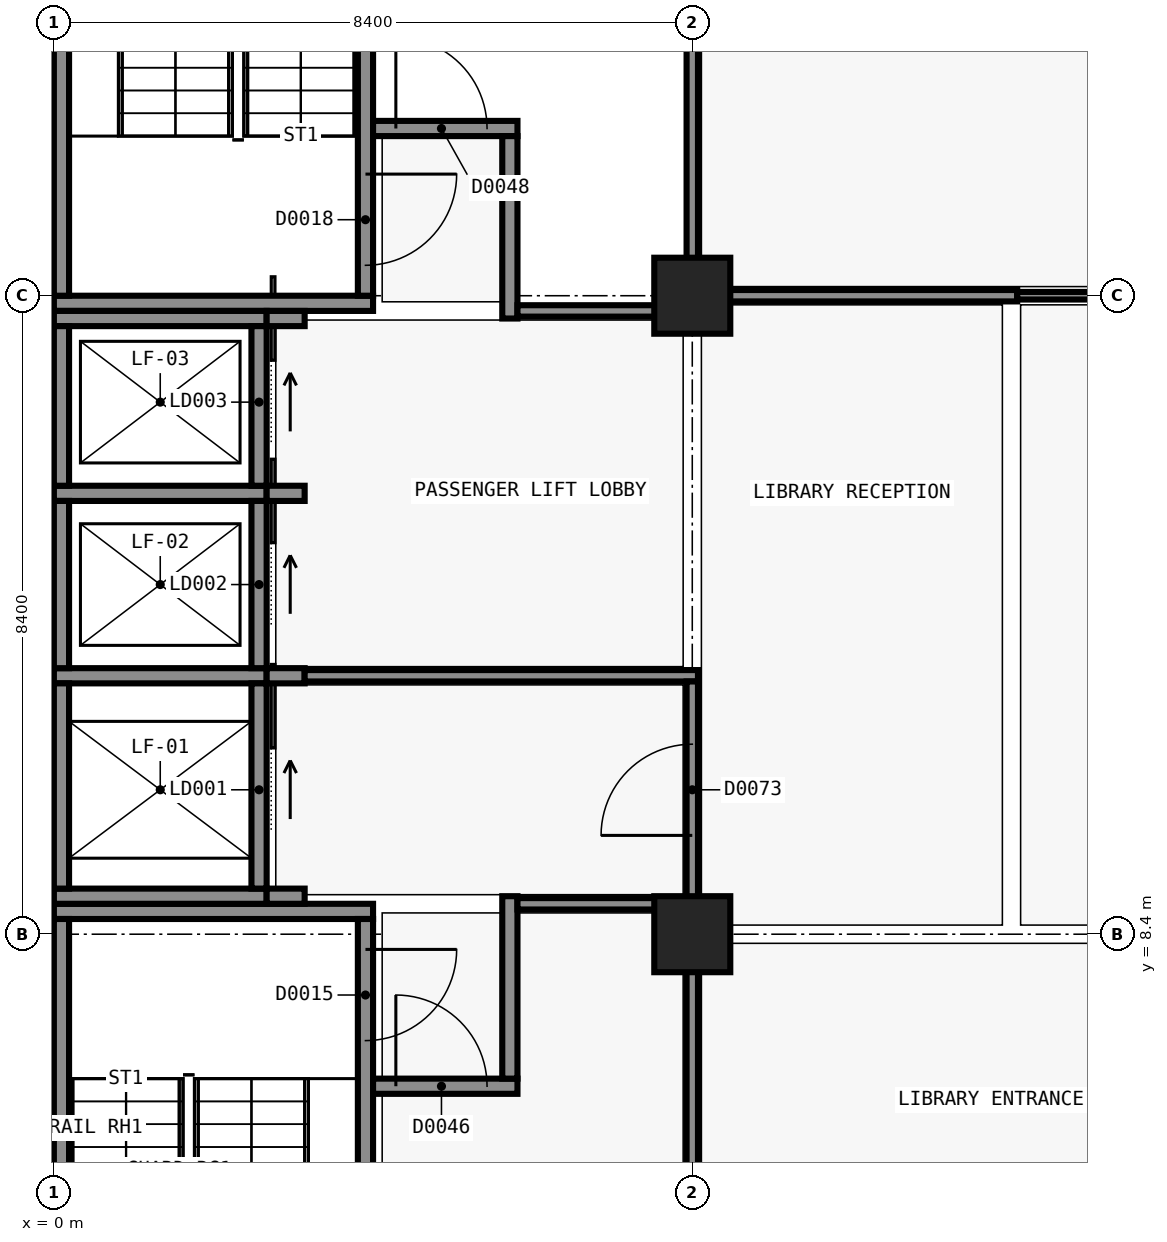
"""IFC4 building model, lengths in metres.
Left out: names, types, materials, properties, quantities, classifications, styles, units other than length and angle.
Written with IfcOpenShell. Run it as: python <this file> out.ifc"""

import sys

from ifc_helpers import new_model, si_unit, direction, frame, frame_2d, origin, origin_2d, place, context, subcontext, project, spatial, rectangle, extrude, element, fill, save


model = new_model("IFC4")
c1 = context("Model", 3, precision=1e-05, world=origin(), true_north=direction((0.0, 1.0)))
c2 = subcontext(c1, "Body", "Model", "MODEL_VIEW")
j1 = project(units=[si_unit("LENGTHUNIT", "METRE"), si_unit("PLANEANGLEUNIT", "RADIAN")], contexts=[c1])
p1 = place(None, origin())
s1 = spatial("IfcSite", under=j1, at=p1, CompositionType="ELEMENT")
p2 = place(p1, origin())
s2 = spatial("IfcBuilding", under=s1, at=p2, CompositionType="ELEMENT")
p3 = place(p2, origin())
s3 = spatial("IfcBuildingStorey", under=s2, at=p3, CompositionType="ELEMENT", Elevation=0.0)
p4 = place(p3, frame((0.0, 8.7, -0.3), z_axis=(0.0, 0.0, 1.0), x_axis=(1.0, 0.0, 0.0)))
e1 = element("IfcWall", 1, at=p4, inside=s3, PredefinedType="SHEAR", context=c2, shape_type="SweptSolid", body=[
    extrude(rectangle(XDim=4.199, YDim=0.2, at=frame_2d((2.1, 0.0))), origin(), (0.0, 0.0, 1.0), 5.7),
])
p5 = place(p3, frame((0.1, 0.2, -0.3), z_axis=(0.0, 0.0, 1.0), x_axis=(0.0, 1.0, 0.0)))
e2 = element("IfcWall", 2, at=p5, inside=s3, PredefinedType="SHEAR", context=c2, shape_type="SweptSolid", body=[
    extrude(rectangle(XDim=8.4, YDim=0.2, at=frame_2d((4.2, 0.0))), origin(), (0.0, 0.0, 1.0), 5.7),
])
p6 = place(p3, frame((4.1, 8.6, -0.3), z_axis=(0.0, 0.0, 1.0), x_axis=(0.0, -1.0, 0.0)))
e3 = element("IfcWall", 3, at=p6, inside=s3, PredefinedType="SHEAR", context=c2, shape_type="SweptSolid", body=[
    extrude(rectangle(XDim=8.4, YDim=0.2, at=frame_2d((4.2, 0.0))), origin(), (0.0, 0.0, 1.0), 5.7),
])
p7 = place(p6, frame((0.4, 0.0, 0.3)))
e4 = element("IfcOpeningElement", 4, at=p7, cuts=e3, PredefinedType="OPENING", context=c2, shape_type="SweptSolid", body=[
    extrude(rectangle(XDim=1.2, YDim=2.1, at=frame_2d((0.6, 1.05))), frame((0.0, 0.11, 0.0), z_axis=(0.0, -1.0, 0.0), x_axis=(1.0, 0.0, 0.0)), (0.0, 0.0, 1.0), 0.22),
])
p8 = place(p3, frame((4.2, 16.7, -0.3), z_axis=(0.0, 0.0, 1.0), x_axis=(-1.0, 0.0, 0.0)))
e5 = element("IfcWall", 5, at=p8, inside=s3, PredefinedType="SHEAR", context=c2, shape_type="SweptSolid", body=[
    extrude(rectangle(XDim=4.199, YDim=0.2, at=frame_2d((2.1, 0.0))), origin(), (0.0, 0.0, 1.0), 5.7),
])
p9 = place(p3, frame((0.1, 16.8, -0.3), z_axis=(0.0, 0.0, 1.0), x_axis=(0.0, 1.0, 0.0)))
e6 = element("IfcWall", 6, at=p9, inside=s3, PredefinedType="SHEAR", context=c2, shape_type="SweptSolid", body=[
    extrude(rectangle(XDim=8.2, YDim=0.2, at=frame_2d((4.1, 0.0))), origin(), (0.0, 0.0, 1.0), 5.7),
])
p10 = place(p3, frame((4.1, 25.0, -0.3), z_axis=(0.0, 0.0, 1.0), x_axis=(0.0, -1.0, 0.0)))
e7 = element("IfcWall", 7, at=p10, inside=s3, PredefinedType="SHEAR", context=c2, shape_type="SweptSolid", body=[
    extrude(rectangle(XDim=8.2, YDim=0.2, at=frame_2d((4.1, 0.0))), origin(), (0.0, 0.0, 1.0), 5.7),
])
p11 = place(p10, frame((6.6, 0.0, 0.3)))
e8 = element("IfcOpeningElement", 8, at=p11, cuts=e7, PredefinedType="OPENING", context=c2, shape_type="SweptSolid", body=[
    extrude(rectangle(XDim=1.2, YDim=2.1, at=frame_2d((0.6, 1.05))), frame((0.0, 0.11, 0.0), z_axis=(0.0, -1.0, 0.0), x_axis=(1.0, 0.0, 0.0)), (0.0, 0.0, 1.0), 0.22),
])
for number, where, z_axis, x_axis in (
    (9, (2.8, 8.9, -1.6), (0.0, 0.0, 1.0), (-1.0, 0.0, 0.0)),
    (10, (0.0, 11.8, -1.6), (0.0, 0.0, 1.0), (1.0, 0.0, 0.0)),
):
    element("IfcWall", number, at=place(p3, frame(where, z_axis=z_axis, x_axis=x_axis)), inside=s3, PredefinedType="SHEAR", context=c2, shape_type="SweptSolid", body=[
        extrude(rectangle(XDim=2.8, YDim=0.2, at=frame_2d((1.4, 0.0))), origin(), (0.0, 0.0, 1.0), 7.0),
    ])
p12 = place(p3, frame((0.1, 9.0, -1.6), z_axis=(0.0, 0.0, 1.0), x_axis=(0.0, 1.0, 0.0)))
e11 = element("IfcWall", 11, at=p12, inside=s3, PredefinedType="SHEAR", context=c2, shape_type="SweptSolid", body=[
    extrude(rectangle(XDim=2.7, YDim=0.2, at=frame_2d((1.35, 0.0))), origin(), (0.0, 0.0, 1.0), 7.0),
])
p13 = place(p3, frame((2.7, 11.7, -1.6), z_axis=(0.0, 0.0, 1.0), x_axis=(0.0, -1.0, 0.0)))
e12 = element("IfcWall", 12, at=p13, inside=s3, PredefinedType="SHEAR", context=c2, shape_type="SweptSolid", body=[
    extrude(rectangle(XDim=2.7, YDim=0.2, at=frame_2d((1.35, 0.0))), origin(), (0.0, 0.0, 1.0), 7.0),
])
p14 = place(p13, frame((0.85, 0.0, 1.6)))
e13 = element("IfcOpeningElement", 13, at=p14, cuts=e12, PredefinedType="OPENING", context=c2, shape_type="SweptSolid", body=[
    extrude(rectangle(XDim=1.1, YDim=2.1, at=frame_2d((0.55, 1.05))), frame((0.0, 0.11, 0.0), z_axis=(0.0, -1.0, 0.0), x_axis=(1.0, 0.0, 0.0)), (0.0, 0.0, 1.0), 0.22),
])
p15 = place(p3, frame((0.0, 14.2, -1.6), z_axis=(0.0, 0.0, 1.0), x_axis=(1.0, 0.0, 0.0)))
e14 = element("IfcWall", 14, at=p15, inside=s3, PredefinedType="SHEAR", context=c2, shape_type="SweptSolid", body=[
    extrude(rectangle(XDim=2.8, YDim=0.2, at=frame_2d((1.4, 0.0))), origin(), (0.0, 0.0, 1.0), 7.0),
])
p16 = place(p3, frame((0.1, 11.9, -1.6), z_axis=(0.0, 0.0, 1.0), x_axis=(0.0, 1.0, 0.0)))
e15 = element("IfcWall", 15, at=p16, inside=s3, PredefinedType="SHEAR", context=c2, shape_type="SweptSolid", body=[
    extrude(rectangle(XDim=2.2, YDim=0.2, at=frame_2d((1.1, 0.0))), origin(), (0.0, 0.0, 1.0), 7.0),
])
p17 = place(p3, frame((2.7, 14.1, -1.6), z_axis=(0.0, 0.0, 1.0), x_axis=(0.0, -1.0, 0.0)))
e16 = element("IfcWall", 16, at=p17, inside=s3, PredefinedType="SHEAR", context=c2, shape_type="SweptSolid", body=[
    extrude(rectangle(XDim=2.2, YDim=0.2, at=frame_2d((1.1, 0.0))), origin(), (0.0, 0.0, 1.0), 7.0),
])
p18 = place(p17, frame((0.55, 0.0, 1.6)))
e17 = element("IfcOpeningElement", 17, at=p18, cuts=e16, PredefinedType="OPENING", context=c2, shape_type="SweptSolid", body=[
    extrude(rectangle(XDim=1.1, YDim=2.1, at=frame_2d((0.55, 1.05))), frame((0.0, 0.11, 0.0), z_axis=(0.0, -1.0, 0.0), x_axis=(1.0, 0.0, 0.0)), (0.0, 0.0, 1.0), 0.22),
])
p19 = place(p3, frame((0.0, 16.5, -1.6), z_axis=(0.0, 0.0, 1.0), x_axis=(1.0, 0.0, 0.0)))
e18 = element("IfcWall", 18, at=p19, inside=s3, PredefinedType="SHEAR", context=c2, shape_type="SweptSolid", body=[
    extrude(rectangle(XDim=2.8, YDim=0.2, at=frame_2d((1.4, 0.0))), origin(), (0.0, 0.0, 1.0), 7.0),
])
p20 = place(p3, frame((0.1, 14.3, -1.6), z_axis=(0.0, 0.0, 1.0), x_axis=(0.0, 1.0, 0.0)))
e19 = element("IfcWall", 19, at=p20, inside=s3, PredefinedType="SHEAR", context=c2, shape_type="SweptSolid", body=[
    extrude(rectangle(XDim=2.1, YDim=0.2, at=frame_2d((1.05, 0.0))), origin(), (0.0, 0.0, 1.0), 7.0),
])
p21 = place(p3, frame((2.7, 16.4, -1.6), z_axis=(0.0, 0.0, 1.0), x_axis=(0.0, -1.0, 0.0)))
e20 = element("IfcWall", 20, at=p21, inside=s3, PredefinedType="SHEAR", context=c2, shape_type="SweptSolid", body=[
    extrude(rectangle(XDim=2.1, YDim=0.2, at=frame_2d((1.05, 0.0))), origin(), (0.0, 0.0, 1.0), 7.0),
])
p22 = place(p21, frame((0.45, 0.0, 1.6)))
e21 = element("IfcOpeningElement", 21, at=p22, cuts=e20, PredefinedType="OPENING", context=c2, shape_type="SweptSolid", body=[
    extrude(rectangle(XDim=1.1, YDim=2.1, at=frame_2d((0.55, 1.05))), frame((0.0, 0.11, 0.0), z_axis=(0.0, -1.0, 0.0), x_axis=(1.0, 0.0, 0.0)), (0.0, 0.0, 1.0), 0.22),
])
for number, where, z_axis, x_axis in (
    (22, (8.4, 8.4, -0.3), (0.0, 0.0, 1.0), (1.0, 0.0, 0.0)),
    (23, (8.4, 16.8, -0.3), (0.0, 0.0, 1.0), (1.0, 0.0, 0.0)),
):
    element("IfcColumn", number, at=place(p3, frame(where, z_axis=z_axis, x_axis=x_axis)), inside=s3, PredefinedType="COLUMN", context=c2, shape_type="SweptSolid", body=[
        extrude(rectangle(XDim=1.0, YDim=1.0, at=origin_2d()), origin(), (0.0, 0.0, 1.0), 5.7),
    ])
for number, where, z_axis, x_axis in (
    (24, (3.3, 8.9, -0.3), (0.0, 0.0, 1.0), (-1.0, 0.0, 0.0)),
    (25, (2.8, 11.8, -0.3), (0.0, 0.0, 1.0), (1.0, 0.0, 0.0)),
    (26, (2.8, 14.2, -0.3), (0.0, 0.0, 1.0), (1.0, 0.0, 0.0)),
    (27, (2.8, 16.5, -0.3), (0.0, 0.0, 1.0), (1.0, 0.0, 0.0)),
):
    element("IfcWall", number, at=place(p3, frame(where, z_axis=z_axis, x_axis=x_axis)), inside=s3, PredefinedType="SHEAR", context=c2, shape_type="SweptSolid", body=[
        extrude(rectangle(XDim=0.5, YDim=0.2, at=frame_2d((0.25, 0.0))), origin(), (0.0, 0.0, 1.0), 5.7),
    ])
p23 = place(p3, frame((4.2, 6.4, 0.0), z_axis=(0.0, 0.0, 1.0), x_axis=(1.0, 0.0, 0.0)))
e28 = element("IfcWall", 28, at=p23, inside=s3, PredefinedType="SOLIDWALL", context=c2, shape_type="SweptSolid", body=[
    extrude(rectangle(XDim=1.9, YDim=0.2, at=frame_2d((0.95, 0.0))), origin(), (0.0, 0.0, 1.0), 5.1),
])
p24 = place(p23, frame((0.3, 0.0, 0.0)))
e29 = element("IfcOpeningElement", 29, at=p24, cuts=e28, PredefinedType="OPENING", context=c2, shape_type="SweptSolid", body=[
    extrude(rectangle(XDim=1.2, YDim=2.1, at=frame_2d((0.6, 1.05))), frame((0.0, 0.11, 0.0), z_axis=(0.0, -1.0, 0.0), x_axis=(1.0, 0.0, 0.0)), (0.0, 0.0, 1.0), 0.22),
])
p25 = place(p3, frame((4.2, 19.0, 0.0), z_axis=(0.0, 0.0, 1.0), x_axis=(1.0, 0.0, 0.0)))
e30 = element("IfcWall", 30, at=p25, inside=s3, PredefinedType="SOLIDWALL", context=c2, shape_type="SweptSolid", body=[
    extrude(rectangle(XDim=1.9, YDim=0.2, at=frame_2d((0.95, 0.0))), origin(), (0.0, 0.0, 1.0), 5.1),
])
p26 = place(p25, frame((0.3, 0.0, 0.0)))
e31 = element("IfcOpeningElement", 31, at=p26, cuts=e30, PredefinedType="OPENING", context=c2, shape_type="SweptSolid", body=[
    extrude(rectangle(XDim=1.2, YDim=2.1, at=frame_2d((0.6, 1.05))), frame((0.0, 0.11, 0.0), z_axis=(0.0, -1.0, 0.0), x_axis=(1.0, 0.0, 0.0)), (0.0, 0.0, 1.0), 0.22),
])
for number, where, z_axis, x_axis in (
    (32, (6.0, 6.5, 0.0), (0.0, 0.0, 1.0), (0.0, 1.0, 0.0)),
    (33, (6.0, 16.5, 0.0), (0.0, 0.0, 1.0), (0.0, 1.0, 0.0)),
):
    element("IfcWall", number, at=place(p3, frame(where, z_axis=z_axis, x_axis=x_axis)), inside=s3, PredefinedType="SOLIDWALL", context=c2, shape_type="SweptSolid", body=[
        extrude(rectangle(XDim=2.4, YDim=0.2, at=frame_2d((1.2, 0.0))), origin(), (0.0, 0.0, 1.0), 4.6),
    ])
p27 = place(p3, frame((8.325, 16.8, 0.0), z_axis=(0.0, 0.0, 1.0), x_axis=(1.0, 0.0, 0.0)))
e34 = element("IfcWall", 34, at=p27, inside=s3, PredefinedType="PARTITIONING", context=c2, shape_type="SweptSolid", body=[
    extrude(rectangle(XDim=4.35, YDim=0.15, at=frame_2d((2.175, 0.0))), origin(), (0.0, 0.0, 1.0), 4.4),
])
p28 = place(p3, frame((6.1, 8.8, 0.0), z_axis=(0.0, 0.0, 1.0), x_axis=(1.0, 0.0, 0.0)))
e35 = element("IfcWall", 35, at=p28, inside=s3, PredefinedType="SOLIDWALL", context=c2, shape_type="SweptSolid", body=[
    extrude(rectangle(XDim=2.375, YDim=0.15, at=frame_2d((1.188, 0.0))), origin(), (0.0, 0.0, 1.0), 4.4),
])
p29 = place(p3, frame((3.3, 11.8, 0.0), z_axis=(0.0, 0.0, 1.0), x_axis=(1.0, 0.0, 0.0)))
e36 = element("IfcWall", 36, at=p29, inside=s3, PredefinedType="SOLIDWALL", context=c2, shape_type="SweptSolid", body=[
    extrude(rectangle(XDim=5.175, YDim=0.15, at=frame_2d((2.587, 0.0))), origin(), (0.0, 0.0, 1.0), 4.4),
])
p30 = place(p3, frame((6.1, 16.6, 0.0), z_axis=(0.0, 0.0, 1.0), x_axis=(1.0, 0.0, 0.0)))
e37 = element("IfcWall", 37, at=p30, inside=s3, PredefinedType="SOLIDWALL", context=c2, shape_type="SweptSolid", body=[
    extrude(rectangle(XDim=2.375, YDim=0.15, at=frame_2d((1.188, 0.0))), origin(), (0.0, 0.0, 1.0), 4.4),
])
p31 = place(p3, frame((8.4, 1.2, 0.0), z_axis=(0.0, 0.0, 1.0), x_axis=(0.0, 1.0, 0.0)))
e38 = element("IfcWall", 38, at=p31, inside=s3, PredefinedType="PARTITIONING", context=c2, shape_type="SweptSolid", body=[
    extrude(rectangle(XDim=7.525, YDim=0.15, at=frame_2d((3.763, 0.0))), origin(), (0.0, 0.0, 1.0), 4.4),
])
p32 = place(p3, frame((8.4, 8.875, 0.0), z_axis=(0.0, 0.0, 1.0), x_axis=(0.0, 1.0, 0.0)))
e39 = element("IfcWall", 39, at=p32, inside=s3, PredefinedType="SOLIDWALL", context=c2, shape_type="SweptSolid", body=[
    extrude(rectangle(XDim=2.85, YDim=0.15, at=frame_2d((1.425, 0.0))), origin(), (0.0, 0.0, 1.0), 4.4),
])
p33 = place(p32, frame((0.825, 0.0, 0.0)))
e40 = element("IfcOpeningElement", 40, at=p33, cuts=e39, PredefinedType="OPENING", context=c2, shape_type="SweptSolid", body=[
    extrude(rectangle(XDim=1.2, YDim=2.1, at=frame_2d((0.6, 1.05))), frame((0.0, 0.085, 0.0), z_axis=(0.0, -1.0, 0.0), x_axis=(1.0, 0.0, 0.0)), (0.0, 0.0, 1.0), 0.17),
])
p34 = place(p3, frame((8.4, 16.875, 0.0), z_axis=(0.0, 0.0, 1.0), x_axis=(0.0, 1.0, 0.0)))
e41 = element("IfcWall", 41, at=p34, inside=s3, PredefinedType="SOLIDWALL", context=c2, shape_type="SweptSolid", body=[
    extrude(rectangle(XDim=7.125, YDim=0.15, at=frame_2d((3.562, 0.0))), origin(), (0.0, 0.0, 1.0), 4.4),
])
p35 = place(p3, frame((12.675, 16.8, 0.0), z_axis=(0.0, 0.0, 1.0), x_axis=(1.0, 0.0, 0.0)))
e42 = element("IfcWall", 42, at=p35, inside=s3, PredefinedType="PARTITIONING", context=c2, shape_type="SweptSolid", body=[
    extrude(rectangle(XDim=12.45, YDim=0.1, at=frame_2d((6.225, 0.0))), origin(), (0.0, 0.0, 1.0), 4.4),
])
p36 = place(p35, frame((4.775, 0.0, 0.0)))
e43 = element("IfcOpeningElement", 43, at=p36, cuts=e42, PredefinedType="OPENING", context=c2, shape_type="SweptSolid", body=[
    extrude(rectangle(XDim=1.0, YDim=2.1, at=frame_2d((0.5, 1.05))), frame((0.0, 0.06, 0.0), z_axis=(0.0, -1.0, 0.0), x_axis=(1.0, 0.0, 0.0)), (0.0, 0.0, 1.0), 0.12),
])
p37 = place(p14, origin())
e44 = element("IfcDoor", 44, at=p37, inside=s3, OperationType="SLIDING_TO_LEFT", PredefinedType="DOOR", context=c2, shape_type="SweptSolid", body=[
    extrude(rectangle(XDim=1.1, YDim=2.1, at=frame_2d((0.55, 1.05))), frame((0.0, 0.025, 0.0), z_axis=(0.0, -1.0, 0.0), x_axis=(1.0, 0.0, 0.0)), (0.0, 0.0, 1.0), 0.05),
])
fill(e13, e44)
p38 = place(p18, origin())
e45 = element("IfcDoor", 45, at=p38, inside=s3, OperationType="SLIDING_TO_LEFT", PredefinedType="DOOR", context=c2, shape_type="SweptSolid", body=[
    extrude(rectangle(XDim=1.1, YDim=2.1, at=frame_2d((0.55, 1.05))), frame((0.0, 0.025, 0.0), z_axis=(0.0, -1.0, 0.0), x_axis=(1.0, 0.0, 0.0)), (0.0, 0.0, 1.0), 0.05),
])
fill(e17, e45)
p39 = place(p22, origin())
e46 = element("IfcDoor", 46, at=p39, inside=s3, OperationType="SLIDING_TO_LEFT", PredefinedType="DOOR", context=c2, shape_type="SweptSolid", body=[
    extrude(rectangle(XDim=1.1, YDim=2.1, at=frame_2d((0.55, 1.05))), frame((0.0, 0.025, 0.0), z_axis=(0.0, -1.0, 0.0), x_axis=(1.0, 0.0, 0.0)), (0.0, 0.0, 1.0), 0.05),
])
fill(e21, e46)
p40 = place(p7, origin())
e47 = element("IfcDoor", 47, at=p40, inside=s3, OperationType="SINGLE_SWING_RIGHT", PredefinedType="DOOR", context=c2, shape_type="SweptSolid", body=[
    extrude(rectangle(XDim=1.2, YDim=2.1, at=frame_2d((0.6, 1.05))), frame((0.0, 0.025, 0.0), z_axis=(0.0, -1.0, 0.0), x_axis=(1.0, 0.0, 0.0)), (0.0, 0.0, 1.0), 0.05),
])
fill(e4, e47)
p41 = place(p11, origin())
e48 = element("IfcDoor", 48, at=p41, inside=s3, OperationType="SINGLE_SWING_RIGHT", PredefinedType="DOOR", context=c2, shape_type="SweptSolid", body=[
    extrude(rectangle(XDim=1.2, YDim=2.1, at=frame_2d((0.6, 1.05))), frame((0.0, 0.025, 0.0), z_axis=(0.0, -1.0, 0.0), x_axis=(1.0, 0.0, 0.0)), (0.0, 0.0, 1.0), 0.05),
])
fill(e8, e48)
p42 = place(p24, origin())
e49 = element("IfcDoor", 49, at=p42, inside=s3, OperationType="SINGLE_SWING_LEFT", PredefinedType="DOOR", context=c2, shape_type="SweptSolid", body=[
    extrude(rectangle(XDim=1.2, YDim=2.1, at=frame_2d((0.6, 1.05))), frame((0.0, 0.025, 0.0), z_axis=(0.0, -1.0, 0.0), x_axis=(1.0, 0.0, 0.0)), (0.0, 0.0, 1.0), 0.05),
])
fill(e29, e49)
p43 = place(p26, origin())
e50 = element("IfcDoor", 50, at=p43, inside=s3, OperationType="SINGLE_SWING_LEFT", PredefinedType="DOOR", context=c2, shape_type="SweptSolid", body=[
    extrude(rectangle(XDim=1.2, YDim=2.1, at=frame_2d((0.6, 1.05))), frame((0.0, 0.025, 0.0), z_axis=(0.0, -1.0, 0.0), x_axis=(1.0, 0.0, 0.0)), (0.0, 0.0, 1.0), 0.05),
])
fill(e31, e50)
p44 = place(p33, origin())
e51 = element("IfcDoor", 51, at=p44, inside=s3, OperationType="SINGLE_SWING_RIGHT", PredefinedType="DOOR", context=c2, shape_type="SweptSolid", body=[
    extrude(rectangle(XDim=1.2, YDim=2.1, at=frame_2d((0.6, 1.05))), frame((0.0, 0.025, 0.0), z_axis=(0.0, -1.0, 0.0), x_axis=(1.0, 0.0, 0.0)), (0.0, 0.0, 1.0), 0.05),
])
fill(e40, e51)
save(model, sys.argv[1])
